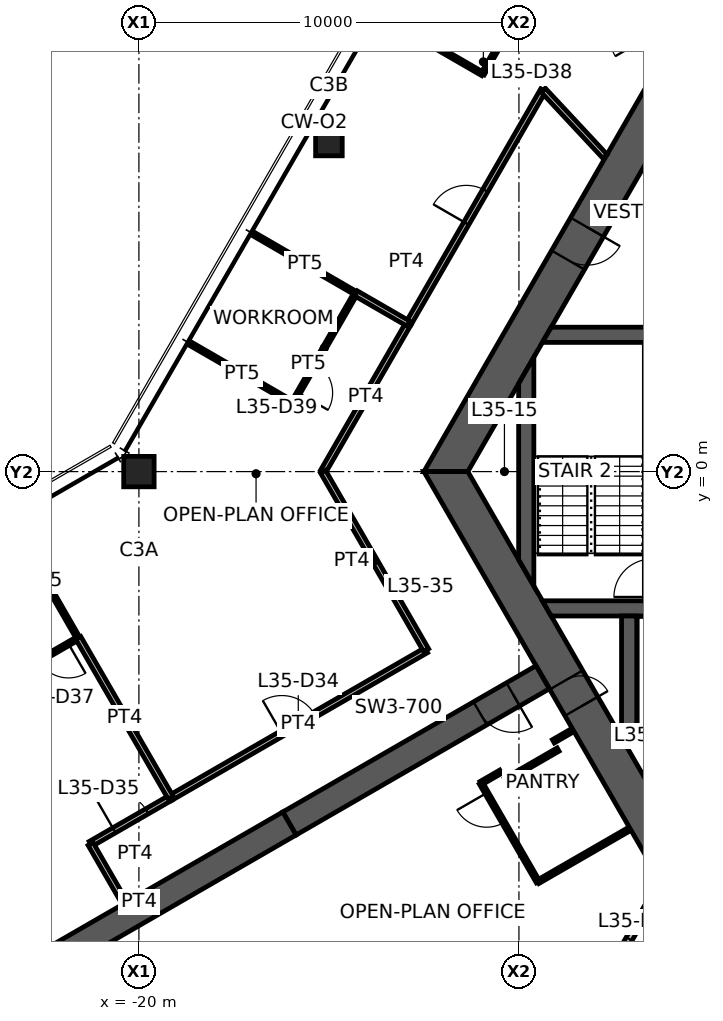
"""IFC4 building model, lengths in metres.
Left out: names, types, materials, properties, quantities, classifications, styles, units other than length and angle.
Written with IfcOpenShell. Run it as: python <this file> out.ifc"""

import sys

from ifc_helpers import new_model, si_unit, direction, frame, frame_2d, origin, origin_2d, place, context, subcontext, project, spatial, polyline, rectangle, hollow_rectangle, outline, extrude, element, fill, save


model = new_model("IFC4")
c1 = context("Model", 3, precision=1e-05, world=origin(), true_north=direction((0.0, 1.0)))
c2 = subcontext(c1, "Body", "Model", "MODEL_VIEW")
j1 = project(units=[si_unit("LENGTHUNIT", "METRE"), si_unit("PLANEANGLEUNIT", "RADIAN")], contexts=[c1])
p1 = place(None, origin())
s1 = spatial("IfcSite", under=j1, at=p1, CompositionType="ELEMENT")
p2 = place(p1, origin())
s2 = spatial("IfcBuilding", under=s1, at=p2, CompositionType="ELEMENT")
p3 = place(p2, frame((0.0, 0.0, 140.9)))
s3 = spatial("IfcBuildingStorey", under=s2, at=p3, CompositionType="ELEMENT", Elevation=140.9)
p4 = place(p3, frame((-20.0, 0.0, 0.0), z_axis=(0.0, 0.0, 1.0), x_axis=(1.0, 0.0, 0.0)))
e1 = element("IfcColumn", 1, at=p4, inside=s3, PredefinedType="COLUMN", context=c2, shape_type="SweptSolid", body=[
    extrude(hollow_rectangle(XDim=0.8, YDim=0.8, WallThickness=0.045, at=origin_2d()), origin(), (0.0, 0.0, 1.0), 3.9),
])
p5 = place(p3, frame((-15.0, 8.66, 0.0), z_axis=(0.0, 0.0, 1.0), x_axis=(1.0, 0.0, 0.0)))
e2 = element("IfcColumn", 2, at=p5, inside=s3, PredefinedType="COLUMN", context=c2, shape_type="SweptSolid", body=[
    extrude(hollow_rectangle(XDim=0.7, YDim=0.7, WallThickness=0.036, at=origin_2d()), origin(), (0.0, 0.0, 1.0), 3.9),
])
p6 = place(p3, frame((-5.961, 10.325, 0.0), z_axis=(0.0, 0.0, 1.0), x_axis=(-0.500004296715, -0.866022923061, 0.0)))
e3 = element("IfcWall", 3, at=p6, inside=s3, PredefinedType="SHEAR", context=c2, shape_type="SweptSolid", body=[
    extrude(outline(polyline([(-0.289, -0.5), (4.494, -0.5), (5.494, -0.5), (12.211, -0.5), (11.634, 0.5), (5.494, 0.5), (4.494, 0.5), (0.289, 0.5), (-0.289, -0.5)])), origin(), (0.0, 0.0, 1.0), 3.9),
])
p7 = place(p6, frame((4.494, 0.0, 0.0)))
e4 = element("IfcOpeningElement", 4, at=p7, cuts=e3, PredefinedType="OPENING", context=c2, shape_type="SweptSolid", body=[
    extrude(rectangle(XDim=1.0, YDim=2.1, at=frame_2d((0.5, 1.05))), frame((0.0, 0.51, 0.0), z_axis=(0.0, -1.0, 0.0), x_axis=(1.0, 0.0, 0.0)), (0.0, 0.0, 1.0), 1.02),
])
p8 = place(p3, frame((-11.922, 0.0, 0.0), z_axis=(0.0, 0.0, 1.0), x_axis=(0.500004296715, -0.866022923061, 0.0)))
e5 = element("IfcWall", 5, at=p8, inside=s3, PredefinedType="SHEAR", context=c2, shape_type="SweptSolid", body=[
    extrude(outline(polyline([(-0.289, -0.5), (6.331, -0.5), (7.131, -0.5), (12.211, -0.5), (11.634, 0.5), (7.131, 0.5), (6.331, 0.5), (0.289, 0.5), (-0.289, -0.5)])), origin(), (0.0, 0.0, 1.0), 3.9),
])
p9 = place(p8, frame((6.331, 0.0, 0.0)))
e6 = element("IfcOpeningElement", 6, at=p9, cuts=e5, PredefinedType="OPENING", context=c2, shape_type="SweptSolid", body=[
    extrude(rectangle(XDim=0.8, YDim=2.1, at=frame_2d((0.4, 1.05))), frame((0.0, 0.51, 0.0), z_axis=(0.0, -1.0, 0.0), x_axis=(1.0, 0.0, 0.0)), (0.0, 0.0, 1.0), 1.02),
])
p10 = place(p3, frame((-9.375, -5.413, 0.0), z_axis=(0.0, 0.0, 1.0), x_axis=(-0.866032377459, -0.499987921047, 0.0)))
e7 = element("IfcWall", 7, at=p10, inside=s3, PredefinedType="SHEAR", context=c2, shape_type="SweptSolid", body=[
    extrude(rectangle(XDim=7.696, YDim=0.7, at=frame_2d((3.848, 0.0))), origin(), (0.0, 0.0, 1.0), 3.9),
])
p11 = place(p10, frame((0.9, 0.0, 0.0)))
e8 = element("IfcOpeningElement", 8, at=p11, cuts=e7, PredefinedType="OPENING", context=c2, shape_type="SweptSolid", body=[
    extrude(rectangle(XDim=1.0, YDim=2.1, at=frame_2d((0.5, 1.05))), frame((0.0, 0.36, 0.0), z_axis=(0.0, -1.0, 0.0), x_axis=(1.0, 0.0, 0.0)), (0.0, 0.0, 1.0), 0.72),
])
p12 = place(p3, frame((-16.039, -9.26, 0.0), z_axis=(0.0, 0.0, 1.0), x_axis=(-0.866024837091, -0.50000098154, 0.0)))
e9 = element("IfcWall", 9, at=p12, inside=s3, PredefinedType="SHEAR", context=c2, shape_type="SweptSolid", body=[
    extrude(rectangle(XDim=13.0, YDim=0.7, at=frame_2d((6.5, 0.0))), origin(), (0.0, 0.0, 1.0), 3.9),
])
p13 = place(p3, frame((-9.266, 3.6, 0.0), z_axis=(0.0, 0.0, 1.0), x_axis=(1.0, 0.0, 0.0)))
e10 = element("IfcWall", 10, at=p13, inside=s3, PredefinedType="SHEAR", context=c2, shape_type="SweptSolid", body=[
    extrude(outline(polyline([(-0.115, -0.2), (3.266, -0.2), (4.266, -0.2), (5.667, -0.2), (6.767, -0.2), (7.866, -0.2), (7.866, 0.2), (6.767, 0.2), (5.667, 0.2), (4.266, 0.2), (3.266, 0.2), (0.115, 0.2), (-0.115, -0.2)])), origin(), (0.0, 0.0, 1.0), 3.9),
])
p14 = place(p13, frame((3.266, 0.0, 0.0)))
e11 = element("IfcOpeningElement", 11, at=p14, cuts=e10, PredefinedType="OPENING", context=c2, shape_type="SweptSolid", body=[
    extrude(rectangle(XDim=1.0, YDim=2.1, at=frame_2d((0.5, 1.05))), frame((0.0, 0.21, 0.0), z_axis=(0.0, -1.0, 0.0), x_axis=(1.0, 0.0, 0.0)), (0.0, 0.0, 1.0), 0.42),
])
p15 = place(p13, frame((5.667, 0.0, 0.0)))
e12 = element("IfcOpeningElement", 12, at=p15, cuts=e10, PredefinedType="OPENING", context=c2, shape_type="SweptSolid", body=[
    extrude(rectangle(XDim=1.1, YDim=2.1, at=frame_2d((0.55, 1.05))), frame((0.0, 0.21, 0.0), z_axis=(0.0, -1.0, 0.0), x_axis=(1.0, 0.0, 0.0)), (0.0, 0.0, 1.0), 0.42),
])
p16 = place(p3, frame((-9.266, -3.6, 0.0), z_axis=(0.0, 0.0, 1.0), x_axis=(1.0, 0.0, 0.0)))
e13 = element("IfcWall", 13, at=p16, inside=s3, PredefinedType="SHEAR", context=c2, shape_type="SweptSolid", body=[
    extrude(outline(polyline([(0.115, -0.2), (3.116, -0.2), (4.417, -0.2), (5.667, -0.2), (6.767, -0.2), (7.866, -0.2), (7.866, 0.2), (6.767, 0.2), (5.667, 0.2), (4.417, 0.2), (3.116, 0.2), (-0.115, 0.2), (0.115, -0.2)])), origin(), (0.0, 0.0, 1.0), 3.9),
])
p17 = place(p16, frame((5.667, 0.0, 0.0)))
e14 = element("IfcOpeningElement", 14, at=p17, cuts=e13, PredefinedType="OPENING", context=c2, shape_type="SweptSolid", body=[
    extrude(rectangle(XDim=1.1, YDim=2.1, at=frame_2d((0.55, 1.05))), frame((0.0, 0.21, 0.0), z_axis=(0.0, -1.0, 0.0), x_axis=(1.0, 0.0, 0.0)), (0.0, 0.0, 1.0), 0.42),
])
p18 = place(p16, frame((3.116, 0.0, 0.0)))
e15 = element("IfcOpeningElement", 15, at=p18, cuts=e13, PredefinedType="OPENING", context=c2, shape_type="SweptSolid", body=[
    extrude(rectangle(XDim=1.3, YDim=2.1, at=frame_2d((0.65, 1.05))), frame((0.0, 0.21, 0.0), z_axis=(0.0, -1.0, 0.0), x_axis=(1.0, 0.0, 0.0)), (0.0, 0.0, 1.0), 0.42),
])
p19 = place(p3, frame((-6.9, -7.0, 0.0), z_axis=(0.0, 0.0, 1.0), x_axis=(1.0, 0.0, 0.0)))
e16 = element("IfcWall", 16, at=p19, inside=s3, PredefinedType="SHEAR", context=c2, shape_type="SweptSolid", body=[
    extrude(rectangle(XDim=2.2, YDim=0.4, at=frame_2d((1.1, 0.0))), origin(), (0.0, 0.0, 1.0), 3.9),
])
p20 = place(p3, frame((-7.1, -3.8, 0.0), z_axis=(0.0, 0.0, 1.0), x_axis=(0.0, -1.0, 0.0)))
e17 = element("IfcWall", 17, at=p20, inside=s3, PredefinedType="SHEAR", context=c2, shape_type="SweptSolid", body=[
    extrude(outline(polyline([(0.0, -0.2), (3.206, -0.2), (3.4, 0.0), (3.4, 0.2), (0.0, 0.2), (0.0, -0.2)])), origin(), (0.0, 0.0, 1.0), 3.9),
])
p21 = place(p3, frame((-9.808, -2.662, 0.0), z_axis=(0.0, 0.0, 1.0), x_axis=(0.0, 1.0, 0.0)))
e18 = element("IfcWall", 18, at=p21, inside=s3, PredefinedType="SHEAR", context=c2, shape_type="SweptSolid", body=[
    extrude(outline(polyline([(-0.346, -0.2), (5.671, -0.2), (4.978, 0.2), (0.346, 0.2), (-0.346, -0.2)])), origin(), (0.0, 0.0, 1.0), 3.9),
])
p22 = place(p3, frame((-6.035, 10.453, 0.0), z_axis=(0.0, 0.0, 1.0), x_axis=(-0.499989830942, 0.866031274813, 0.0)))
e19 = element("IfcWall", 19, at=p22, inside=s3, PredefinedType="PARTITIONING", context=c2, shape_type="SweptSolid", body=[
    extrude(rectangle(XDim=7.93, YDim=0.175, at=frame_2d((3.965, 0.0))), origin(), (0.0, 0.0, 1.0), 3.05),
])
p23 = place(p22, frame((1.13, 0.0, 0.0)))
e20 = element("IfcOpeningElement", 20, at=p23, cuts=e19, PredefinedType="OPENING", context=c2, shape_type="SweptSolid", body=[
    extrude(rectangle(XDim=1.0, YDim=2.1, at=frame_2d((0.5, 1.05))), frame((0.0, 0.098, 0.0), z_axis=(0.0, -1.0, 0.0), x_axis=(1.0, 0.0, 0.0)), (0.0, 0.0, 1.0), 0.195),
])
p24 = place(p3, frame((-6.035, -10.453, 0.0), z_axis=(0.0, 0.0, 1.0), x_axis=(-0.499989830942, -0.866031274813, 0.0)))
e21 = element("IfcWall", 21, at=p24, inside=s3, PredefinedType="PARTITIONING", context=c2, shape_type="SweptSolid", body=[
    extrude(rectangle(XDim=7.93, YDim=0.175, at=frame_2d((3.965, 0.0))), origin(), (0.0, 0.0, 1.0), 3.05),
])
p25 = place(p24, frame((1.13, 0.0, 0.0)))
e22 = element("IfcOpeningElement", 22, at=p25, cuts=e21, PredefinedType="OPENING", context=c2, shape_type="SweptSolid", body=[
    extrude(rectangle(XDim=1.0, YDim=2.1, at=frame_2d((0.5, 1.05))), frame((0.0, 0.098, 0.0), z_axis=(0.0, -1.0, 0.0), x_axis=(1.0, 0.0, 0.0)), (0.0, 0.0, 1.0), 0.195),
])
p26 = place(p3, frame((-19.171, -8.586, 0.0), z_axis=(0.0, 0.0, 1.0), x_axis=(0.866007176269, 0.500031569654, 0.0)))
e23 = element("IfcWall", 23, at=p26, inside=s3, PredefinedType="PARTITIONING", context=c2, shape_type="SweptSolid", body=[
    extrude(rectangle(XDim=7.771, YDim=0.15, at=frame_2d((3.885, 0.0))), origin(), (0.0, 0.0, 1.0), 2.95),
])
p27 = place(p26, frame((3.385, 0.0, 0.0)))
e24 = element("IfcOpeningElement", 24, at=p27, cuts=e23, PredefinedType="OPENING", context=c2, shape_type="SweptSolid", body=[
    extrude(rectangle(XDim=1.0, YDim=2.1, at=frame_2d((0.5, 1.05))), frame((0.0, 0.085, 0.0), z_axis=(0.0, -1.0, 0.0), x_axis=(1.0, 0.0, 0.0)), (0.0, 0.0, 1.0), 0.17),
])
p28 = place(p3, frame((-15.156, 0.0, 0.0), z_axis=(0.0, 0.0, 1.0), x_axis=(0.500014848696, 0.866016830716, 0.0)))
e25 = element("IfcWall", 25, at=p28, inside=s3, PredefinedType="PARTITIONING", context=c2, shape_type="SweptSolid", body=[
    extrude(rectangle(XDim=4.505, YDim=0.15, at=frame_2d((2.252, 0.0))), origin(), (0.0, 0.0, 1.0), 2.95),
])
p29 = place(p3, frame((-12.442, -4.7, 0.0), z_axis=(0.0, 0.0, 1.0), x_axis=(-0.500009286329, 0.866020042254, 0.0)))
e26 = element("IfcWall", 26, at=p29, inside=s3, PredefinedType="PARTITIONING", context=c2, shape_type="SweptSolid", body=[
    extrude(rectangle(XDim=5.428, YDim=0.15, at=frame_2d((2.714, 0.0))), origin(), (0.0, 0.0, 1.0), 2.95),
])
p30 = place(p3, frame((-21.271, -9.798, 0.0), z_axis=(0.0, 0.0, 1.0), x_axis=(0.866025270247, 0.500000231294, 0.0)))
e27 = element("IfcWall", 27, at=p30, inside=s3, PredefinedType="PARTITIONING", context=c2, shape_type="SweptSolid", body=[
    extrude(rectangle(XDim=2.435, YDim=0.15, at=frame_2d((1.217, 0.0))), origin(), (0.0, 0.0, 1.0), 2.95),
])
p31 = place(p30, frame((0.717, 0.0, 0.0)))
e28 = element("IfcOpeningElement", 28, at=p31, cuts=e27, PredefinedType="OPENING", context=c2, shape_type="SweptSolid", body=[
    extrude(rectangle(XDim=1.0, YDim=2.1, at=frame_2d((0.5, 1.05))), frame((0.0, 0.085, 0.0), z_axis=(0.0, -1.0, 0.0), x_axis=(1.0, 0.0, 0.0)), (0.0, 0.0, 1.0), 0.17),
])
p32 = place(p3, frame((-20.381, -11.34, 0.0), z_axis=(0.0, 0.0, 1.0), x_axis=(-0.500062787734, 0.865989150234, 0.0)))
e29 = element("IfcWall", 29, at=p32, inside=s3, PredefinedType="PARTITIONING", context=c2, shape_type="SweptSolid", body=[
    extrude(rectangle(XDim=1.78, YDim=0.15, at=frame_2d((0.89, 0.0))), origin(), (0.0, 0.0, 1.0), 2.95),
])
p33 = place(p3, frame((-12.908, 3.893, 0.0), z_axis=(0.0, 0.0, 1.0), x_axis=(0.500006411147, 0.866021702275, 0.0)))
e30 = element("IfcWall", 30, at=p33, inside=s3, PredefinedType="PARTITIONING", context=c2, shape_type="SweptSolid", body=[
    extrude(rectangle(XDim=7.095, YDim=0.15, at=frame_2d((3.548, 0.0))), origin(), (0.0, 0.0, 1.0), 2.95),
])
p34 = place(p33, frame((3.047, 0.0, 0.0)))
e31 = element("IfcOpeningElement", 31, at=p34, cuts=e30, PredefinedType="OPENING", context=c2, shape_type="SweptSolid", body=[
    extrude(rectangle(XDim=1.0, YDim=2.1, at=frame_2d((0.5, 1.05))), frame((0.0, 0.085, 0.0), z_axis=(0.0, -1.0, 0.0), x_axis=(1.0, 0.0, 0.0)), (0.0, 0.0, 1.0), 0.17),
])
p35 = place(p3, frame((-9.36, 10.038, 0.0), z_axis=(0.0, 0.0, 1.0), x_axis=(0.681997114248, -0.731354863358, 0.0)))
e32 = element("IfcWall", 32, at=p35, inside=s3, PredefinedType="PARTITIONING", context=c2, shape_type="SweptSolid", body=[
    extrude(outline(polyline([(0.0, -0.075), (2.384, -0.075), (2.384, 0.0), (2.382, 0.075), (0.0, 0.075), (0.0, -0.075)])), origin(), (0.0, 0.0, 1.0), 2.95),
])
p36 = place(p3, frame((-23.332, -1.37, 0.0), z_axis=(0.0, 0.0, 1.0), x_axis=(0.498863855434, -0.86668036423, 0.0)))
e33 = element("IfcWall", 33, at=p36, inside=s3, PredefinedType="PARTITIONING", context=c2, shape_type="SweptSolid", body=[
    extrude(rectangle(XDim=3.48, YDim=0.1, at=frame_2d((1.74, 0.0))), origin(), (0.0, 0.0, 1.0), 2.95),
])
p37 = place(p3, frame((-21.594, -4.379, 0.0), z_axis=(0.0, 0.0, 1.0), x_axis=(-0.865682888643, -0.500592784916, 0.0)))
e34 = element("IfcWall", 34, at=p37, inside=s3, PredefinedType="PARTITIONING", context=c2, shape_type="SweptSolid", body=[
    extrude(rectangle(XDim=6.62, YDim=0.1, at=frame_2d((3.31, 0.0))), origin(), (0.0, 0.0, 1.0), 2.95),
])
p38 = place(p37, frame((0.3, 0.0, 0.0)))
e35 = element("IfcOpeningElement", 35, at=p38, cuts=e34, PredefinedType="OPENING", context=c2, shape_type="SweptSolid", body=[
    extrude(rectangle(XDim=0.9, YDim=2.1, at=frame_2d((0.45, 1.05))), frame((0.0, 0.06, 0.0), z_axis=(0.0, -1.0, 0.0), x_axis=(1.0, 0.0, 0.0)), (0.0, 0.0, 1.0), 0.12),
])
p39 = place(p3, frame((-10.956, 10.465, 0.0), z_axis=(0.0, 0.0, 1.0), x_axis=(-0.866044340336, 0.499967199496, 0.0)))
e36 = element("IfcWall", 36, at=p39, inside=s3, PredefinedType="PARTITIONING", context=c2, shape_type="SweptSolid", body=[
    extrude(rectangle(XDim=3.08, YDim=0.1, at=frame_2d((1.54, 0.0))), origin(), (0.0, 0.0, 1.0), 2.95),
])
p40 = place(p3, frame((-9.291, 13.349, 0.0), z_axis=(0.0, 0.0, 1.0), x_axis=(-0.500033344505, -0.86600615147, 0.0)))
e37 = element("IfcWall", 37, at=p40, inside=s3, PredefinedType="PARTITIONING", context=c2, shape_type="SweptSolid", body=[
    extrude(rectangle(XDim=3.331, YDim=0.1, at=frame_2d((1.666, 0.0))), origin(), (0.0, 0.0, 1.0), 2.95),
])
p41 = place(p40, frame((0.3, 0.0, 0.0)))
e38 = element("IfcOpeningElement", 38, at=p41, cuts=e37, PredefinedType="OPENING", context=c2, shape_type="SweptSolid", body=[
    extrude(rectangle(XDim=0.9, YDim=2.1, at=frame_2d((0.45, 1.05))), frame((0.0, 0.06, 0.0), z_axis=(0.0, -1.0, 0.0), x_axis=(1.0, 0.0, 0.0)), (0.0, 0.0, 1.0), 0.12),
])
p42 = place(p3, frame((-15.952, 1.811, 0.0), z_axis=(0.0, 0.0, 1.0), x_axis=(-0.866029832698, 0.499992328818, 0.0)))
e39 = element("IfcWall", 39, at=p42, inside=s3, PredefinedType="PARTITIONING", context=c2, shape_type="SweptSolid", body=[
    extrude(rectangle(XDim=3.08, YDim=0.1, at=frame_2d((1.54, 0.0))), origin(), (0.0, 0.0, 1.0), 2.95),
])
p43 = place(p3, frame((-14.291, 4.698, 0.0), z_axis=(0.0, 0.0, 1.0), x_axis=(-0.498780940327, -0.866728085138, 0.0)))
e40 = element("IfcWall", 40, at=p43, inside=s3, PredefinedType="PARTITIONING", context=c2, shape_type="SweptSolid", body=[
    extrude(rectangle(XDim=3.331, YDim=0.1, at=frame_2d((1.666, 0.0))), origin(), (0.0, 0.0, 1.0), 2.95),
])
p44 = place(p43, frame((2.131, 0.0, 0.0)))
e41 = element("IfcOpeningElement", 41, at=p44, cuts=e40, PredefinedType="OPENING", context=c2, shape_type="SweptSolid", body=[
    extrude(rectangle(XDim=0.9, YDim=2.1, at=frame_2d((0.45, 1.05))), frame((0.0, 0.06, 0.0), z_axis=(0.0, -1.0, 0.0), x_axis=(1.0, 0.0, 0.0)), (0.0, 0.0, 1.0), 0.12),
])
p45 = place(p3, frame((-16.976, 6.248, 0.0), z_axis=(0.0, 0.0, 1.0), x_axis=(0.865232439327, -0.501370946442, 0.0)))
e42 = element("IfcWall", 42, at=p45, inside=s3, PredefinedType="PARTITIONING", context=c2, shape_type="SweptSolid", body=[
    extrude(rectangle(XDim=3.105, YDim=0.1, at=frame_2d((1.553, 0.0))), origin(), (0.0, 0.0, 1.0), 2.95),
])
p46 = place(p3, frame((-19.163, -8.581, 0.0), z_axis=(0.0, 0.0, 1.0), x_axis=(-0.500843945189, 0.865537603209, 0.0)))
e43 = element("IfcWall", 43, at=p46, inside=s3, PredefinedType="PARTITIONING", context=c2, shape_type="SweptSolid", body=[
    extrude(rectangle(XDim=4.854, YDim=0.15, at=frame_2d((2.427, 0.0))), origin(), (0.0, 0.0, 1.0), 2.95),
])
p47 = place(p3, frame((-14.289, 4.691, 0.0), z_axis=(0.0, 0.0, 1.0), x_axis=(0.865925490132, -0.500173015605, 0.0)))
e44 = element("IfcWall", 44, at=p47, inside=s3, PredefinedType="PARTITIONING", context=c2, shape_type="SweptSolid", body=[
    extrude(rectangle(XDim=1.595, YDim=0.15, at=frame_2d((0.797, 0.0))), origin(), (0.0, 0.0, 1.0), 2.95),
])
p48 = place(p3, frame((-11.0, -8.198, 0.0), z_axis=(0.0, 0.0, 1.0), x_axis=(0.866131372301, 0.499816412211, 0.0)))
e45 = element("IfcWall", 45, at=p48, inside=s3, PredefinedType="PARTITIONING", context=c2, shape_type="SweptSolid", body=[
    extrude(rectangle(XDim=0.6, YDim=0.1, at=frame_2d((0.3, 0.0))), origin(), (0.0, 0.0, 1.0), 2.95),
])
p49 = place(p3, frame((-10.355, -8.115, 0.0), z_axis=(0.0, 0.0, 1.0), x_axis=(0.866094119867, 0.499880961361, 0.0)))
e46 = element("IfcWall", 46, at=p49, inside=s3, PredefinedType="PARTITIONING", context=c2, shape_type="SweptSolid", body=[
    extrude(rectangle(XDim=1.6, YDim=0.1, at=frame_2d((0.8, 0.0))), origin(), (0.0, 0.0, 1.0), 2.95),
])
p50 = place(p3, frame((-9.5, -10.796, 0.0), z_axis=(0.0, 0.0, 1.0), x_axis=(-0.499990139034, 0.866031096941, 0.0)))
e47 = element("IfcWall", 47, at=p50, inside=s3, PredefinedType="PARTITIONING", context=c2, shape_type="SweptSolid", body=[
    extrude(rectangle(XDim=3.0, YDim=0.1, at=frame_2d((1.5, 0.0))), origin(), (0.0, 0.0, 1.0), 2.95),
])
p51 = place(p50, frame((1.8, 0.0, 0.0)))
e48 = element("IfcOpeningElement", 48, at=p51, cuts=e47, PredefinedType="OPENING", context=c2, shape_type="SweptSolid", body=[
    extrude(rectangle(XDim=0.9, YDim=2.1, at=frame_2d((0.45, 1.05))), frame((0.0, 0.06, 0.0), z_axis=(0.0, -1.0, 0.0), x_axis=(1.0, 0.0, 0.0)), (0.0, 0.0, 1.0), 0.12),
])
p52 = place(p3, frame((-9.094, -7.098, 0.0), z_axis=(0.0, 0.0, 1.0), x_axis=(0.865954211699, 0.50012328804, 0.0)))
e49 = element("IfcWall", 49, at=p52, inside=s3, PredefinedType="PARTITIONING", context=c2, shape_type="SweptSolid", body=[
    extrude(rectangle(XDim=0.58, YDim=0.1, at=frame_2d((0.29, 0.0))), origin(), (0.0, 0.0, 1.0), 2.95),
])
p53 = place(p3, frame((-7.092, -9.406, 0.0), z_axis=(0.0, 0.0, 1.0), x_axis=(-0.86603494908, -0.499983466698, 0.0)))
e50 = element("IfcWall", 50, at=p53, inside=s3, PredefinedType="PARTITIONING", context=c2, shape_type="SweptSolid", body=[
    extrude(rectangle(XDim=2.78, YDim=0.1, at=frame_2d((1.39, 0.0))), origin(), (0.0, 0.0, 1.0), 2.95),
])
p54 = place(p9, origin())
e51 = element("IfcDoor", 51, at=p54, inside=s3, OperationType="SINGLE_SWING_RIGHT", PredefinedType="DOOR", context=c2, shape_type="SweptSolid", body=[
    extrude(rectangle(XDim=0.8, YDim=2.1, at=frame_2d((0.4, 1.05))), frame((0.0, 0.025, 0.0), z_axis=(0.0, -1.0, 0.0), x_axis=(1.0, 0.0, 0.0)), (0.0, 0.0, 1.0), 0.05),
])
fill(e6, e51)
p55 = place(p7, origin())
e52 = element("IfcDoor", 52, at=p55, inside=s3, OperationType="SINGLE_SWING_LEFT", PredefinedType="DOOR", context=c2, shape_type="SweptSolid", body=[
    extrude(rectangle(XDim=1.0, YDim=2.1, at=frame_2d((0.5, 1.05))), frame((0.0, 0.025, 0.0), z_axis=(0.0, -1.0, 0.0), x_axis=(1.0, 0.0, 0.0)), (0.0, 0.0, 1.0), 0.05),
])
fill(e4, e52)
p56 = place(p11, origin())
e53 = element("IfcDoor", 53, at=p56, inside=s3, OperationType="SINGLE_SWING_LEFT", PredefinedType="DOOR", context=c2, shape_type="SweptSolid", body=[
    extrude(rectangle(XDim=1.0, YDim=2.1, at=frame_2d((0.5, 1.05))), frame((0.0, 0.025, 0.0), z_axis=(0.0, -1.0, 0.0), x_axis=(1.0, 0.0, 0.0)), (0.0, 0.0, 1.0), 0.05),
])
fill(e8, e53)
p57 = place(p25, origin())
e54 = element("IfcDoor", 54, at=p57, inside=s3, OperationType="SINGLE_SWING_LEFT", PredefinedType="DOOR", context=c2, shape_type="SweptSolid", body=[
    extrude(rectangle(XDim=1.0, YDim=2.1, at=frame_2d((0.5, 1.05))), frame((0.0, 0.025, 0.0), z_axis=(0.0, -1.0, 0.0), x_axis=(1.0, 0.0, 0.0)), (0.0, 0.0, 1.0), 0.05),
])
fill(e22, e54)
p58 = place(p27, origin())
e55 = element("IfcDoor", 55, at=p58, inside=s3, OperationType="SINGLE_SWING_LEFT", PredefinedType="DOOR", context=c2, shape_type="SweptSolid", body=[
    extrude(rectangle(XDim=1.0, YDim=2.1, at=frame_2d((0.5, 1.05))), frame((0.0, 0.025, 0.0), z_axis=(0.0, -1.0, 0.0), x_axis=(1.0, 0.0, 0.0)), (0.0, 0.0, 1.0), 0.05),
])
fill(e24, e55)
p59 = place(p31, origin())
e56 = element("IfcDoor", 56, at=p59, inside=s3, OperationType="SINGLE_SWING_LEFT", PredefinedType="DOOR", context=c2, shape_type="SweptSolid", body=[
    extrude(rectangle(XDim=1.0, YDim=2.1, at=frame_2d((0.5, 1.05))), frame((0.0, 0.025, 0.0), z_axis=(0.0, -1.0, 0.0), x_axis=(1.0, 0.0, 0.0)), (0.0, 0.0, 1.0), 0.05),
])
fill(e28, e56)
p60 = place(p34, origin())
e57 = element("IfcDoor", 57, at=p60, inside=s3, OperationType="SINGLE_SWING_LEFT", PredefinedType="DOOR", context=c2, shape_type="SweptSolid", body=[
    extrude(rectangle(XDim=1.0, YDim=2.1, at=frame_2d((0.5, 1.05))), frame((0.0, 0.025, 0.0), z_axis=(0.0, -1.0, 0.0), x_axis=(1.0, 0.0, 0.0)), (0.0, 0.0, 1.0), 0.05),
])
fill(e31, e57)
p61 = place(p38, origin())
e58 = element("IfcDoor", 58, at=p61, inside=s3, OperationType="SINGLE_SWING_LEFT", PredefinedType="DOOR", context=c2, shape_type="SweptSolid", body=[
    extrude(rectangle(XDim=0.9, YDim=2.1, at=frame_2d((0.45, 1.05))), frame((0.0, 0.025, 0.0), z_axis=(0.0, -1.0, 0.0), x_axis=(1.0, 0.0, 0.0)), (0.0, 0.0, 1.0), 0.05),
])
fill(e35, e58)
p62 = place(p44, origin())
e59 = element("IfcDoor", 59, at=p62, inside=s3, OperationType="SINGLE_SWING_RIGHT", PredefinedType="DOOR", context=c2, shape_type="SweptSolid", body=[
    extrude(rectangle(XDim=0.9, YDim=2.1, at=frame_2d((0.45, 1.05))), frame((0.0, 0.025, 0.0), z_axis=(0.0, -1.0, 0.0), x_axis=(1.0, 0.0, 0.0)), (0.0, 0.0, 1.0), 0.05),
])
fill(e41, e59)
p63 = place(p51, origin())
e60 = element("IfcDoor", 60, at=p63, inside=s3, OperationType="SINGLE_SWING_RIGHT", PredefinedType="DOOR", context=c2, shape_type="SweptSolid", body=[
    extrude(rectangle(XDim=0.9, YDim=2.1, at=frame_2d((0.45, 1.05))), frame((0.0, 0.025, 0.0), z_axis=(0.0, -1.0, 0.0), x_axis=(1.0, 0.0, 0.0)), (0.0, 0.0, 1.0), 0.05),
])
fill(e48, e60)
save(model, sys.argv[1])
